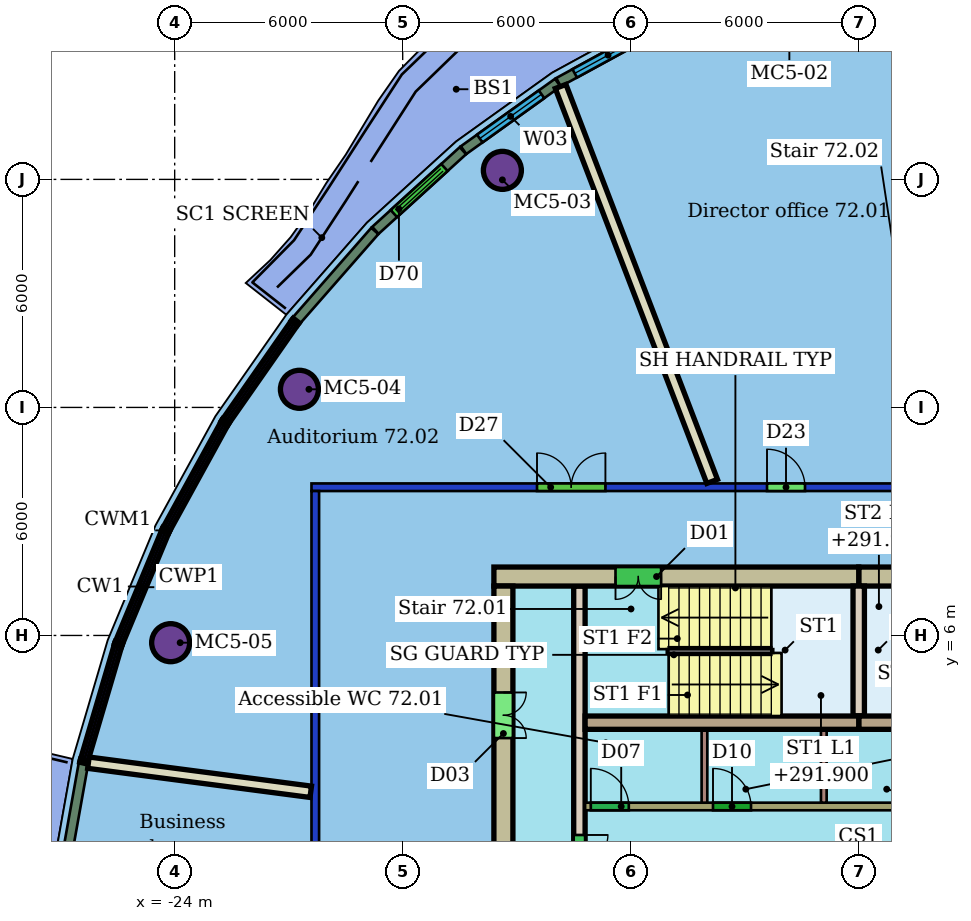
"""IFC4 building model, lengths in metres.
Left out: names, types, materials, properties, quantities, classifications, styles, units other than length and angle.
Written with IfcOpenShell. Run it as: python <this file> out.ifc"""

import sys

from ifc_helpers import new_model, si_unit, direction, frame, frame_2d, origin, origin_2d, place, context, subcontext, project, spatial, rectangle, hollow_circle, extrude, element, fill, save


model = new_model("IFC4")
c1 = context("Model", 3, precision=1e-05, world=origin(), true_north=direction((0.0, 1.0)))
c2 = subcontext(c1, "Body", "Model", "MODEL_VIEW")
j1 = project(units=[si_unit("LENGTHUNIT", "METRE"), si_unit("PLANEANGLEUNIT", "RADIAN")], contexts=[c1])
p1 = place(None, origin())
s1 = spatial("IfcSite", under=j1, at=p1, CompositionType="ELEMENT")
p2 = place(p1, origin())
s2 = spatial("IfcBuilding", under=s1, at=p2, CompositionType="ELEMENT")
p3 = place(p2, frame((0.0, 0.0, 290.1)))
s3 = spatial("IfcBuildingStorey", under=s2, at=p3, CompositionType="ELEMENT", Elevation=290.1)
for number, where, z_axis, x_axis in (
    (1, (-15.377, 18.238, 0.0), (0.0, 0.0, 1.0), (1.0, 0.0, 0.0)),
    (2, (-20.718, 12.477, 0.0), (0.0, 0.0, 1.0), (1.0, 0.0, 0.0)),
    (3, (-24.106, 5.81, 0.0), (0.0, 0.0, 1.0), (1.0, 0.0, 0.0)),
):
    element("IfcColumn", number, at=place(p3, frame(where, z_axis=z_axis, x_axis=x_axis)), inside=s3, PredefinedType="COLUMN", context=c2, shape_type="SweptSolid", body=[
        extrude(hollow_circle(Radius=0.5, WallThickness=0.04, at=origin_2d()), origin(), (0.0, 0.0, 1.0), 3.45),
    ])
p4 = place(p3, frame((-20.3, -9.8, 0.0), z_axis=(0.0, 0.0, 1.0), x_axis=(0.0, 1.0, 0.0)))
e4 = element("IfcWall", 4, at=p4, inside=s3, PredefinedType="PARTITIONING", context=c2, shape_type="SweptSolid", body=[
    extrude(rectangle(XDim=19.6, YDim=0.2, at=frame_2d((9.8, 0.0))), origin(), (0.0, 0.0, 1.0), 3.1),
])
p5 = place(p4, frame((8.396, 0.0, 0.0)))
e5 = element("IfcOpeningElement", 5, at=p5, cuts=e4, PredefinedType="OPENING", context=c2, shape_type="SweptSolid", body=[
    extrude(rectangle(XDim=1.5, YDim=2.1, at=frame_2d((0.75, 1.05))), frame((0.0, 0.11, 0.0), z_axis=(0.0, -1.0, 0.0), x_axis=(1.0, 0.0, 0.0)), (0.0, 0.0, 1.0), 0.22),
])
p6 = place(p4, frame((4.205, 0.0, 0.0)))
e6 = element("IfcOpeningElement", 6, at=p6, cuts=e4, PredefinedType="OPENING", context=c2, shape_type="SweptSolid", body=[
    extrude(rectangle(XDim=1.0, YDim=2.1, at=frame_2d((0.5, 1.05))), frame((0.0, 0.11, 0.0), z_axis=(0.0, -1.0, 0.0), x_axis=(1.0, 0.0, 0.0)), (0.0, 0.0, 1.0), 0.22),
])
p7 = place(p3, frame((-20.4, 9.9, 0.0), z_axis=(0.0, 0.0, 1.0), x_axis=(1.0, 0.0, 0.0)))
e7 = element("IfcWall", 7, at=p7, inside=s3, PredefinedType="PARTITIONING", context=c2, shape_type="SweptSolid", body=[
    extrude(rectangle(XDim=28.8, YDim=0.2, at=frame_2d((14.4, 0.0))), origin(), (0.0, 0.0, 1.0), 3.1),
])
p8 = place(p7, frame((11.987, 0.0, 0.0)))
e8 = element("IfcOpeningElement", 8, at=p8, cuts=e7, PredefinedType="OPENING", context=c2, shape_type="SweptSolid", body=[
    extrude(rectangle(XDim=1.0, YDim=2.4, at=frame_2d((0.5, 1.2))), frame((0.0, 0.11, 0.0), z_axis=(0.0, -1.0, 0.0), x_axis=(1.0, 0.0, 0.0)), (0.0, 0.0, 1.0), 0.22),
])
p9 = place(p7, frame((5.934, 0.0, 0.0)))
e9 = element("IfcOpeningElement", 9, at=p9, cuts=e7, PredefinedType="OPENING", context=c2, shape_type="SweptSolid", body=[
    extrude(rectangle(XDim=1.8, YDim=2.4, at=frame_2d((0.9, 1.2))), frame((0.0, 0.11, 0.0), z_axis=(0.0, -1.0, 0.0), x_axis=(1.0, 0.0, 0.0)), (0.0, 0.0, 1.0), 0.22),
])
p10 = place(p7, frame((22.324, 0.0, 0.0)))
e10 = element("IfcOpeningElement", 10, at=p10, cuts=e7, PredefinedType="OPENING", context=c2, shape_type="SweptSolid", body=[
    extrude(rectangle(XDim=0.9, YDim=2.1, at=frame_2d((0.45, 1.05))), frame((0.0, 0.11, 0.0), z_axis=(0.0, -1.0, 0.0), x_axis=(1.0, 0.0, 0.0)), (0.0, 0.0, 1.0), 0.22),
])
p11 = place(p7, frame((18.235, 0.0, 0.0)))
e11 = element("IfcOpeningElement", 11, at=p11, cuts=e7, PredefinedType="OPENING", context=c2, shape_type="SweptSolid", body=[
    extrude(rectangle(XDim=1.0, YDim=2.1, at=frame_2d((0.5, 1.05))), frame((0.0, 0.11, 0.0), z_axis=(0.0, -1.0, 0.0), x_axis=(1.0, 0.0, 0.0)), (0.0, 0.0, 1.0), 0.22),
])
p12 = place(p3, frame((-13.844, 20.446, 0.0), z_axis=(0.0, 0.0, 1.0), x_axis=(0.358211704093, -0.933640388507, 0.0)))
e12 = element("IfcWall", 12, at=p12, inside=s3, PredefinedType="PARTITIONING", context=c2, shape_type="SweptSolid", body=[
    extrude(rectangle(XDim=11.13, YDim=0.3, at=frame_2d((5.565, 0.0))), origin(), (0.0, 0.0, 1.0), 3.45),
])
p13 = place(p3, frame((-26.27, 2.652, 0.0), z_axis=(0.0, 0.0, 1.0), x_axis=(0.991545872486, -0.129756628948, 0.0)))
e13 = element("IfcWall", 13, at=p13, inside=s3, PredefinedType="PARTITIONING", context=c2, shape_type="SweptSolid", body=[
    extrude(rectangle(XDim=5.9, YDim=0.3, at=frame_2d((2.95, 0.0))), origin(), (0.0, 0.0, 1.0), 3.45),
])
p14 = place(p3, frame((-11.291, 21.981, 0.0), z_axis=(0.0, 0.0, 1.0), x_axis=(-0.877823384271, -0.478984452802, 0.0)))
e14 = element("IfcWall", 14, at=p14, inside=s3, PredefinedType="SOLIDWALL", context=c2, shape_type="SweptSolid", body=[
    extrude(rectangle(XDim=2.973, YDim=0.25, at=frame_2d((1.487, 0.0))), origin(), (0.0, 0.0, 1.0), 3.15),
])
p15 = place(p14, frame((0.487, 0.0, 0.9)))
e15 = element("IfcOpeningElement", 15, at=p15, cuts=e14, PredefinedType="OPENING", context=c2, shape_type="SweptSolid", body=[
    extrude(rectangle(XDim=2.0, YDim=2.1, at=frame_2d((1.0, 1.05))), frame((0.0, 0.135, 0.0), z_axis=(0.0, -1.0, 0.0), x_axis=(1.0, 0.0, 0.0)), (0.0, 0.0, 1.0), 0.27),
])
p16 = place(p3, frame((-13.92, 20.544, 0.0), z_axis=(0.0, 0.0, 1.0), x_axis=(-0.812910032744, -0.582389284469, 0.0)))
e16 = element("IfcWall", 16, at=p16, inside=s3, PredefinedType="SOLIDWALL", context=c2, shape_type="SweptSolid", body=[
    extrude(rectangle(XDim=3.048, YDim=0.25, at=frame_2d((1.524, 0.0))), origin(), (0.0, 0.0, 1.0), 3.15),
])
p17 = place(p16, frame((0.524, 0.0, 0.9)))
e17 = element("IfcOpeningElement", 17, at=p17, cuts=e16, PredefinedType="OPENING", context=c2, shape_type="SweptSolid", body=[
    extrude(rectangle(XDim=2.0, YDim=2.1, at=frame_2d((1.0, 1.05))), frame((0.0, 0.135, 0.0), z_axis=(0.0, -1.0, 0.0), x_axis=(1.0, 0.0, 0.0)), (0.0, 0.0, 1.0), 0.27),
])
p18 = place(p3, frame((-16.416, 18.755, 0.0), z_axis=(0.0, 0.0, 1.0), x_axis=(-0.739421840392, -0.673242409502, 0.0)))
e18 = element("IfcWall", 18, at=p18, inside=s3, PredefinedType="SOLIDWALL", context=c2, shape_type="SweptSolid", body=[
    extrude(rectangle(XDim=3.114, YDim=0.25, at=frame_2d((1.557, 0.0))), origin(), (0.0, 0.0, 1.0), 3.15),
])
p19 = place(p18, frame((0.657, 0.0, 0.0)))
e19 = element("IfcOpeningElement", 19, at=p19, cuts=e18, PredefinedType="OPENING", context=c2, shape_type="SweptSolid", body=[
    extrude(rectangle(XDim=1.8, YDim=2.4, at=frame_2d((0.9, 1.2))), frame((0.0, 0.135, 0.0), z_axis=(0.0, -1.0, 0.0), x_axis=(1.0, 0.0, 0.0)), (0.0, 0.0, 1.0), 0.27),
])
for number, where, z_axis, x_axis in (
    (20, (-18.733, 16.643, 0.0), (0.0, 0.0, 1.0), (-0.659, -0.752, 0.0)),
    (21, (-26.401, 2.627, 0.0), (0.0, 0.0, 1.0), (-0.176, -0.984, 0.0)),
):
    element("IfcWall", number, at=place(p3, frame(where, z_axis=z_axis, x_axis=x_axis)), inside=s3, PredefinedType="SOLIDWALL", context=c2, shape_type="SweptSolid", body=[
        extrude(rectangle(XDim=3.122, YDim=0.25, at=frame_2d((1.561, 0.0))), origin(), (0.0, 0.0, 1.0), 3.15),
    ])
p20 = place(p3, frame((3.6, 7.55, 0.0), z_axis=(0.0, 0.0, 1.0), x_axis=(-1.0, 0.0, 0.0)))
e22 = element("IfcWall", 22, at=p20, inside=s3, PredefinedType="SHEAR", context=c2, shape_type="SweptSolid", body=[
    extrude(rectangle(XDim=9.6, YDim=0.5, at=frame_2d((4.8, 0.0))), origin(), (0.0, 0.0, 1.0), 3.3),
])
p21 = place(p20, frame((3.2, 0.0, 0.0)))
e23 = element("IfcOpeningElement", 23, at=p21, cuts=e22, PredefinedType="OPENING", context=c2, shape_type="SweptSolid", body=[
    extrude(rectangle(XDim=1.2, YDim=2.1, at=frame_2d((0.6, 1.05))), frame((0.0, 0.26, 0.0), z_axis=(0.0, -1.0, 0.0), x_axis=(1.0, 0.0, 0.0)), (0.0, 0.0, 1.0), 0.52),
])
p22 = place(p3, frame((-6.0, 7.55, 0.0), z_axis=(0.0, 0.0, 1.0), x_axis=(-1.0, 0.0, 0.0)))
e24 = element("IfcWall", 24, at=p22, inside=s3, PredefinedType="SHEAR", context=c2, shape_type="SweptSolid", body=[
    extrude(rectangle(XDim=9.6, YDim=0.5, at=frame_2d((4.8, 0.0))), origin(), (0.0, 0.0, 1.0), 3.3),
])
p23 = place(p22, frame((5.2, 0.0, 0.0)))
e25 = element("IfcOpeningElement", 25, at=p23, cuts=e24, PredefinedType="OPENING", context=c2, shape_type="SweptSolid", body=[
    extrude(rectangle(XDim=1.2, YDim=2.1, at=frame_2d((0.6, 1.05))), frame((0.0, 0.26, 0.0), z_axis=(0.0, -1.0, 0.0), x_axis=(1.0, 0.0, 0.0)), (0.0, 0.0, 1.0), 0.52),
])
p24 = place(p3, frame((-15.35, 7.3, 0.0), z_axis=(0.0, 0.0, 1.0), x_axis=(0.0, -1.0, 0.0)))
e26 = element("IfcWall", 26, at=p24, inside=s3, PredefinedType="SHEAR", context=c2, shape_type="SweptSolid", body=[
    extrude(rectangle(XDim=14.6, YDim=0.5, at=frame_2d((7.3, 0.0))), origin(), (0.0, 0.0, 1.0), 3.3),
])
p25 = place(p24, frame((10.6, 0.0, 0.0)))
e27 = element("IfcOpeningElement", 27, at=p25, cuts=e26, PredefinedType="OPENING", context=c2, shape_type="SweptSolid", body=[
    extrude(rectangle(XDim=1.2, YDim=2.1, at=frame_2d((0.6, 1.05))), frame((0.0, 0.26, 0.0), z_axis=(0.0, -1.0, 0.0), x_axis=(1.0, 0.0, 0.0)), (0.0, 0.0, 1.0), 0.52),
])
p26 = place(p24, frame((2.8, 0.0, 0.0)))
e28 = element("IfcOpeningElement", 28, at=p26, cuts=e26, PredefinedType="OPENING", context=c2, shape_type="SweptSolid", body=[
    extrude(rectangle(XDim=1.2, YDim=2.1, at=frame_2d((0.6, 1.05))), frame((0.0, 0.26, 0.0), z_axis=(0.0, -1.0, 0.0), x_axis=(1.0, 0.0, 0.0)), (0.0, 0.0, 1.0), 0.52),
])
for number, where, z_axis, x_axis in (
    (29, (-13.2, 3.705, 0.0), (0.0, 0.0, 1.0), (1.0, 0.0, 0.0)),
    (30, (-6.0, 3.705, 0.0), (0.0, 0.0, 1.0), (1.0, 0.0, 0.0)),
):
    element("IfcWall", number, at=place(p3, frame(where, z_axis=z_axis, x_axis=x_axis)), inside=s3, PredefinedType="SHEAR", context=c2, shape_type="SweptSolid", body=[
        extrude(rectangle(XDim=7.2, YDim=0.35, at=frame_2d((3.6, 0.0))), origin(), (0.0, 0.0, 1.0), 3.3),
    ])
p27 = place(p3, frame((-13.35, 7.3, 0.0), z_axis=(0.0, 0.0, 1.0), x_axis=(0.0, -1.0, 0.0)))
e31 = element("IfcWall", 31, at=p27, inside=s3, PredefinedType="SHEAR", context=c2, shape_type="SweptSolid", body=[
    extrude(rectangle(XDim=14.6, YDim=0.3, at=frame_2d((7.3, 0.0))), origin(), (0.0, 0.0, 1.0), 3.3),
])
p28 = place(p27, frame((6.55, 0.0, 0.0)))
e32 = element("IfcOpeningElement", 32, at=p28, cuts=e31, PredefinedType="OPENING", context=c2, shape_type="SweptSolid", body=[
    extrude(rectangle(XDim=1.5, YDim=2.1, at=frame_2d((0.75, 1.05))), frame((0.0, 0.16, 0.0), z_axis=(0.0, -1.0, 0.0), x_axis=(1.0, 0.0, 0.0)), (0.0, 0.0, 1.0), 0.32),
])
p29 = place(p3, frame((-13.2, 1.5, 0.0), z_axis=(0.0, 0.0, 1.0), x_axis=(1.0, 0.0, 0.0)))
e33 = element("IfcWall", 33, at=p29, inside=s3, PredefinedType="SHEAR", context=c2, shape_type="SweptSolid", body=[
    extrude(rectangle(XDim=14.4, YDim=0.2, at=frame_2d((7.2, 0.0))), origin(), (0.0, 0.0, 1.0), 3.3),
])
p30 = place(p29, frame((10.312, 0.0, 0.0)))
e34 = element("IfcOpeningElement", 34, at=p30, cuts=e33, PredefinedType="OPENING", context=c2, shape_type="SweptSolid", body=[
    extrude(rectangle(XDim=1.1, YDim=2.1, at=frame_2d((0.55, 1.05))), frame((0.0, 0.11, 0.0), z_axis=(0.0, -1.0, 0.0), x_axis=(1.0, 0.0, 0.0)), (0.0, 0.0, 1.0), 0.22),
])
p31 = place(p29, frame((12.754, 0.0, 0.0)))
e35 = element("IfcOpeningElement", 35, at=p31, cuts=e33, PredefinedType="OPENING", context=c2, shape_type="SweptSolid", body=[
    extrude(rectangle(XDim=1.1, YDim=2.1, at=frame_2d((0.55, 1.05))), frame((0.0, 0.11, 0.0), z_axis=(0.0, -1.0, 0.0), x_axis=(1.0, 0.0, 0.0)), (0.0, 0.0, 1.0), 0.22),
])
p32 = place(p29, frame((0.15, 0.0, 0.0)))
e36 = element("IfcOpeningElement", 36, at=p32, cuts=e33, PredefinedType="OPENING", context=c2, shape_type="SweptSolid", body=[
    extrude(rectangle(XDim=1.0, YDim=2.1, at=frame_2d((0.5, 1.05))), frame((0.0, 0.11, 0.0), z_axis=(0.0, -1.0, 0.0), x_axis=(1.0, 0.0, 0.0)), (0.0, 0.0, 1.0), 0.22),
])
p33 = place(p29, frame((3.365, 0.0, 0.0)))
e37 = element("IfcOpeningElement", 37, at=p33, cuts=e33, PredefinedType="OPENING", context=c2, shape_type="SweptSolid", body=[
    extrude(rectangle(XDim=1.0, YDim=2.1, at=frame_2d((0.5, 1.05))), frame((0.0, 0.11, 0.0), z_axis=(0.0, -1.0, 0.0), x_axis=(1.0, 0.0, 0.0)), (0.0, 0.0, 1.0), 0.22),
])
p34 = place(p29, frame((8.467, 0.0, 0.0)))
e38 = element("IfcOpeningElement", 38, at=p34, cuts=e33, PredefinedType="OPENING", context=c2, shape_type="SweptSolid", body=[
    extrude(rectangle(XDim=0.9, YDim=2.1, at=frame_2d((0.45, 1.05))), frame((0.0, 0.11, 0.0), z_axis=(0.0, -1.0, 0.0), x_axis=(1.0, 0.0, 0.0)), (0.0, 0.0, 1.0), 0.22),
])
p35 = place(p3, frame((-6.0, 3.88, 0.0), z_axis=(0.0, 0.0, 1.0), x_axis=(0.0, 1.0, 0.0)))
e39 = element("IfcWall", 39, at=p35, inside=s3, PredefinedType="SHEAR", context=c2, shape_type="SweptSolid", body=[
    extrude(rectangle(XDim=3.42, YDim=0.3, at=frame_2d((1.71, 0.0))), origin(), (0.0, 0.0, 1.0), 3.3),
])
for number, where, z_axis, x_axis in (
    (40, (-10.06, 1.6, 0.0), (0.0, 0.0, 1.0), (0.0, 1.0, 0.0)),
    (41, (-6.919, 1.6, 0.0), (0.0, 0.0, 1.0), (0.0, 1.0, 0.0)),
):
    element("IfcWall", number, at=place(p3, frame(where, z_axis=z_axis, x_axis=x_axis)), inside=s3, PredefinedType="PARTITIONING", context=c2, shape_type="SweptSolid", body=[
        extrude(rectangle(XDim=1.93, YDim=0.15, at=frame_2d((0.965, 0.0))), origin(), (0.0, 0.0, 1.0), 3.3),
    ])
p36 = place(p8, origin())
e42 = element("IfcDoor", 42, at=p36, inside=s3, OperationType="SINGLE_SWING_LEFT", PredefinedType="DOOR", context=c2, shape_type="SweptSolid", body=[
    extrude(rectangle(XDim=1.0, YDim=2.4, at=frame_2d((0.5, 1.2))), frame((0.0, 0.025, 0.0), z_axis=(0.0, -1.0, 0.0), x_axis=(1.0, 0.0, 0.0)), (0.0, 0.0, 1.0), 0.05),
])
fill(e8, e42)
p37 = place(p9, origin())
e43 = element("IfcDoor", 43, at=p37, inside=s3, OperationType="DOUBLE_DOOR_SINGLE_SWING", PredefinedType="DOOR", context=c2, shape_type="SweptSolid", body=[
    extrude(rectangle(XDim=1.8, YDim=2.4, at=frame_2d((0.9, 1.2))), frame((0.0, 0.025, 0.0), z_axis=(0.0, -1.0, 0.0), x_axis=(1.0, 0.0, 0.0)), (0.0, 0.0, 1.0), 0.05),
])
fill(e9, e43)
p38 = place(p15, origin())
e44 = element("IfcWindow", 44, at=p38, inside=s3, PartitioningType="SINGLE_PANEL", PredefinedType="WINDOW", context=c2, shape_type="SweptSolid", body=[
    extrude(rectangle(XDim=2.0, YDim=2.1, at=frame_2d((1.0, 1.05))), frame((0.0, 0.03, 0.0), z_axis=(0.0, -1.0, 0.0), x_axis=(1.0, 0.0, 0.0)), (0.0, 0.0, 1.0), 0.06),
])
fill(e15, e44)
p39 = place(p17, origin())
e45 = element("IfcWindow", 45, at=p39, inside=s3, PartitioningType="SINGLE_PANEL", PredefinedType="WINDOW", context=c2, shape_type="SweptSolid", body=[
    extrude(rectangle(XDim=2.0, YDim=2.1, at=frame_2d((1.0, 1.05))), frame((0.0, 0.03, 0.0), z_axis=(0.0, -1.0, 0.0), x_axis=(1.0, 0.0, 0.0)), (0.0, 0.0, 1.0), 0.06),
])
fill(e17, e45)
p40 = place(p19, origin())
e46 = element("IfcDoor", 46, at=p40, inside=s3, OperationType="DOUBLE_DOOR_SLIDING", PredefinedType="DOOR", context=c2, shape_type="SweptSolid", body=[
    extrude(rectangle(XDim=1.8, YDim=2.4, at=frame_2d((0.9, 1.2))), frame((0.0, 0.025, 0.0), z_axis=(0.0, -1.0, 0.0), x_axis=(1.0, 0.0, 0.0)), (0.0, 0.0, 1.0), 0.05),
])
fill(e19, e46)
p41 = place(p23, origin())
e47 = element("IfcDoor", 47, at=p41, inside=s3, OperationType="DOUBLE_DOOR_SINGLE_SWING", PredefinedType="NOTDEFINED", context=c2, shape_type="SweptSolid", body=[
    extrude(rectangle(XDim=1.2, YDim=2.1, at=frame_2d((0.6, 1.05))), frame((0.0, 0.025, 0.0), z_axis=(0.0, -1.0, 0.0), x_axis=(1.0, 0.0, 0.0)), (0.0, 0.0, 1.0), 0.05),
])
fill(e25, e47)
p42 = place(p26, origin())
e48 = element("IfcDoor", 48, at=p42, inside=s3, OperationType="DOUBLE_DOOR_SINGLE_SWING", PredefinedType="NOTDEFINED", context=c2, shape_type="SweptSolid", body=[
    extrude(rectangle(XDim=1.2, YDim=2.1, at=frame_2d((0.6, 1.05))), frame((0.0, 0.025, 0.0), z_axis=(0.0, -1.0, 0.0), x_axis=(1.0, 0.0, 0.0)), (0.0, 0.0, 1.0), 0.05),
])
fill(e28, e48)
p43 = place(p28, origin())
e49 = element("IfcDoor", 49, at=p43, inside=s3, OperationType="DOUBLE_DOOR_SINGLE_SWING", PredefinedType="NOTDEFINED", context=c2, shape_type="SweptSolid", body=[
    extrude(rectangle(XDim=1.5, YDim=2.1, at=frame_2d((0.75, 1.05))), frame((0.0, 0.025, 0.0), z_axis=(0.0, -1.0, 0.0), x_axis=(1.0, 0.0, 0.0)), (0.0, 0.0, 1.0), 0.05),
])
fill(e32, e49)
p44 = place(p32, origin())
e50 = element("IfcDoor", 50, at=p44, inside=s3, OperationType="SINGLE_SWING_LEFT", PredefinedType="NOTDEFINED", context=c2, shape_type="SweptSolid", body=[
    extrude(rectangle(XDim=1.0, YDim=2.1, at=frame_2d((0.5, 1.05))), frame((0.0, 0.025, 0.0), z_axis=(0.0, -1.0, 0.0), x_axis=(1.0, 0.0, 0.0)), (0.0, 0.0, 1.0), 0.05),
])
fill(e36, e50)
p45 = place(p33, origin())
e51 = element("IfcDoor", 51, at=p45, inside=s3, OperationType="SINGLE_SWING_LEFT", PredefinedType="NOTDEFINED", context=c2, shape_type="SweptSolid", body=[
    extrude(rectangle(XDim=1.0, YDim=2.1, at=frame_2d((0.5, 1.05))), frame((0.0, 0.025, 0.0), z_axis=(0.0, -1.0, 0.0), x_axis=(1.0, 0.0, 0.0)), (0.0, 0.0, 1.0), 0.05),
])
fill(e37, e51)
save(model, sys.argv[1])
